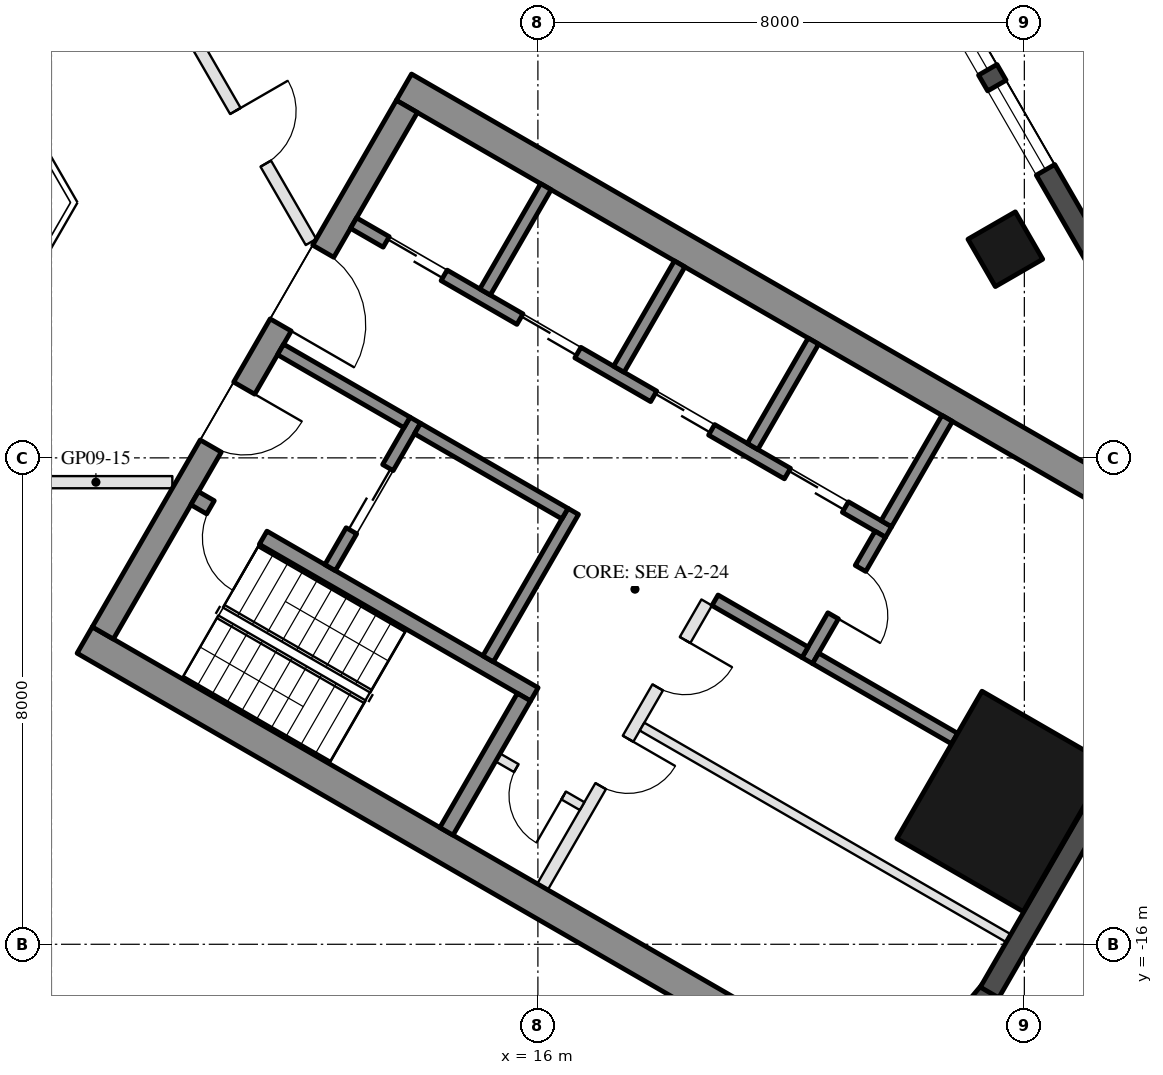
"""IFC4 building model, lengths in metres.
Left out: names, types, materials, properties, quantities, classifications, styles, units other than length and angle.
Written with IfcOpenShell. Run it as: python <this file> out.ifc"""

import sys

from ifc_helpers import new_model, si_unit, direction, frame, frame_2d, origin, origin_2d, place, context, subcontext, project, spatial, rectangle, hollow_rectangle, extrude, element, fill, save


model = new_model("IFC4")
c1 = context("Model", 3, precision=1e-05, world=origin(), true_north=direction((0.0, 1.0)))
c2 = subcontext(c1, "Body", "Model", "MODEL_VIEW")
j1 = project(units=[si_unit("LENGTHUNIT", "METRE"), si_unit("PLANEANGLEUNIT", "RADIAN")], contexts=[c1])
p1 = place(None, origin())
s1 = spatial("IfcSite", under=j1, at=p1, CompositionType="ELEMENT")
p2 = place(p1, origin())
s2 = spatial("IfcBuilding", under=s1, at=p2, CompositionType="ELEMENT")
p3 = place(p2, frame((0.0, 0.0, 109.4)))
s3 = spatial("IfcBuildingStorey", under=s2, at=p3, CompositionType="ELEMENT", Elevation=109.4)
p4 = place(p3, frame((23.688, -4.568, 0.0), z_axis=(0.0, 0.0, 1.0), x_axis=(-0.5, 0.866025403784, 0.0)))
e1 = element("IfcColumn", 1, at=p4, inside=s3, PredefinedType="COLUMN", context=c2, shape_type="SweptSolid", body=[
    extrude(hollow_rectangle(XDim=0.9, YDim=0.9, WallThickness=0.04, at=origin_2d()), origin(), (0.0, 0.0, 1.0), 3.7),
])
p5 = place(p3, frame((23.643, -13.65, 0.0), z_axis=(0.0, 0.0, 1.0), x_axis=(0.5, 0.866025403784, 0.0)))
e2 = element("IfcColumn", 2, at=p5, inside=s3, PredefinedType="COLUMN", context=c2, shape_type="SweptSolid", body=[
    extrude(hollow_rectangle(XDim=2.8, YDim=2.4, WallThickness=0.07, at=origin_2d()), origin(), (0.0, 0.0, 1.0), 3.7),
])
p6 = place(p3, frame((22.217, -18.231, 0.0), z_axis=(0.0, 0.0, 1.0), x_axis=(0.642733291068, 0.76609001857, 0.0)))
e3 = element("IfcWall", 3, at=p6, inside=s3, PredefinedType="SOLIDWALL", context=c2, shape_type="SweptSolid", body=[
    extrude(rectangle(XDim=1.91, YDim=0.35, at=frame_2d((0.955, 0.0))), origin(), (0.0, 0.0, 1.0), 3.55),
])
p7 = place(p3, frame((23.427, -16.792, 0.0), z_axis=(0.0, 0.0, 1.0), x_axis=(0.500018773155, 0.866014564827, 0.0)))
e4 = element("IfcWall", 4, at=p7, inside=s3, PredefinedType="SOLIDWALL", context=c2, shape_type="SweptSolid", body=[
    extrude(rectangle(XDim=5.658, YDim=0.35, at=frame_2d((2.829, 0.0))), origin(), (0.0, 0.0, 1.0), 3.55),
])
p8 = place(p3, frame((26.257, -6.567, 0.0), z_axis=(0.0, 0.0, 1.0), x_axis=(-0.500023526245, 0.866011820475, 0.0)))
e5 = element("IfcWall", 5, at=p8, inside=s3, PredefinedType="SOLIDWALL", context=c2, shape_type="SweptSolid", body=[
    extrude(rectangle(XDim=11.816, YDim=0.35, at=frame_2d((5.908, 0.0))), origin(), (0.0, 0.0, 1.0), 3.55),
])
p9 = place(p8, frame((0.38, 0.0, 0.3)))
e6 = element("IfcOpeningElement", 6, at=p9, cuts=e5, PredefinedType="OPENING", context=c2, shape_type="SweptSolid", body=[
    extrude(rectangle(XDim=1.8, YDim=2.65, at=frame_2d((0.9, 1.325))), frame((0.0, 0.185, 0.0), z_axis=(0.0, -1.0, 0.0), x_axis=(1.0, 0.0, 0.0)), (0.0, 0.0, 1.0), 0.37),
])
p10 = place(p8, frame((7.716, 0.0, 0.0)))
e7 = element("IfcOpeningElement", 7, at=p10, cuts=e5, PredefinedType="OPENING", context=c2, shape_type="SweptSolid", body=[
    extrude(rectangle(XDim=2.4, YDim=2.4, at=frame_2d((1.2, 1.2))), frame((0.0, 0.185, 0.0), z_axis=(0.0, -1.0, 0.0), x_axis=(1.0, 0.0, 0.0)), (0.0, 0.0, 1.0), 0.37),
])
p11 = place(p8, frame((3.816, 0.0, 0.3)))
e8 = element("IfcOpeningElement", 8, at=p11, cuts=e5, PredefinedType="OPENING", context=c2, shape_type="SweptSolid", body=[
    extrude(rectangle(XDim=1.6, YDim=2.65, at=frame_2d((0.8, 1.325))), frame((0.0, 0.185, 0.0), z_axis=(0.0, -1.0, 0.0), x_axis=(1.0, 0.0, 0.0)), (0.0, 0.0, 1.0), 0.37),
])
p12 = place(p8, frame((5.716, 0.0, 0.3)))
e9 = element("IfcOpeningElement", 9, at=p12, cuts=e5, PredefinedType="OPENING", context=c2, shape_type="SweptSolid", body=[
    extrude(rectangle(XDim=1.6, YDim=2.65, at=frame_2d((0.8, 1.325))), frame((0.0, 0.185, 0.0), z_axis=(0.0, -1.0, 0.0), x_axis=(1.0, 0.0, 0.0)), (0.0, 0.0, 1.0), 0.37),
])
for number, where, z_axis, x_axis in (
    (10, (8.547, -10.997, 0.0), (0.0, 0.0, 1.0), (0.866, -0.5, 0.0)),
    (11, (13.797, -1.903, 0.0), (0.0, 0.0, 1.0), (0.866, -0.5, 0.0)),
):
    element("IfcWall", number, at=place(p3, frame(where, z_axis=z_axis, x_axis=x_axis)), inside=s3, PredefinedType="SHEAR", context=c2, shape_type="SweptSolid", body=[
        extrude(rectangle(XDim=14.837, YDim=0.5, at=frame_2d((7.418, 0.0))), origin(), (0.0, 0.0, 1.0), 3.5),
    ])
p13 = place(p3, frame((8.845, -10.88, 0.0), z_axis=(0.0, 0.0, 1.0), x_axis=(0.500004234368, 0.866022959057, 0.0)))
e12 = element("IfcWall", 12, at=p13, inside=s3, PredefinedType="SHEAR", context=c2, shape_type="SweptSolid", body=[
    extrude(rectangle(XDim=10.0, YDim=0.4, at=frame_2d((5.0, 0.0))), origin(), (0.0, 0.0, 1.0), 3.5),
])
p14 = place(p13, frame((3.55, 0.0, 0.0)))
e13 = element("IfcOpeningElement", 13, at=p14, cuts=e12, PredefinedType="OPENING", context=c2, shape_type="SweptSolid", body=[
    extrude(rectangle(XDim=1.1, YDim=2.1, at=frame_2d((0.55, 1.05))), frame((0.0, 0.21, 0.0), z_axis=(0.0, -1.0, 0.0), x_axis=(1.0, 0.0, 0.0)), (0.0, 0.0, 1.0), 0.42),
])
p15 = place(p13, frame((5.85, 0.0, 0.0)))
e14 = element("IfcOpeningElement", 14, at=p15, cuts=e12, PredefinedType="OPENING", context=c2, shape_type="SweptSolid", body=[
    extrude(rectangle(XDim=1.4, YDim=2.1, at=frame_2d((0.7, 1.05))), frame((0.0, 0.21, 0.0), z_axis=(0.0, -1.0, 0.0), x_axis=(1.0, 0.0, 0.0)), (0.0, 0.0, 1.0), 0.42),
])
p16 = place(p3, frame((10.356, -8.664, 0.0), z_axis=(0.0, 0.0, 1.0), x_axis=(0.866028629588, -0.499994412703, 0.0)))
e15 = element("IfcWall", 15, at=p16, inside=s3, PredefinedType="SHEAR", context=c2, shape_type="SweptSolid", body=[
    extrude(rectangle(XDim=6.45, YDim=0.25, at=frame_2d((3.225, 0.0))), origin(), (0.0, 0.0, 1.0), 3.5),
])
p17 = place(p16, frame((0.3, 0.0, 0.0)))
e16 = element("IfcOpeningElement", 16, at=p17, cuts=e15, PredefinedType="OPENING", context=c2, shape_type="SweptSolid", body=[
    extrude(rectangle(XDim=1.0, YDim=2.1, at=frame_2d((0.5, 1.05))), frame((0.0, 0.135, 0.0), z_axis=(0.0, -1.0, 0.0), x_axis=(1.0, 0.0, 0.0)), (0.0, 0.0, 1.0), 0.27),
])
p18 = place(p3, frame((14.496, -14.143, 0.0), z_axis=(0.0, 0.0, 1.0), x_axis=(0.500062241894, 0.865989465428, 0.0)))
e17 = element("IfcWall", 17, at=p18, inside=s3, PredefinedType="SHEAR", context=c2, shape_type="SweptSolid", body=[
    extrude(rectangle(XDim=2.55, YDim=0.25, at=frame_2d((1.275, 0.0))), origin(), (0.0, 0.0, 1.0), 3.5),
])
p19 = place(p3, frame((15.181, -11.305, 0.0), z_axis=(0.0, 0.0, 1.0), x_axis=(0.49994636267, 0.866056369097, 0.0)))
e18 = element("IfcWall", 18, at=p19, inside=s3, PredefinedType="SHEAR", context=c2, shape_type="SweptSolid", body=[
    extrude(rectangle(XDim=2.8, YDim=0.2, at=frame_2d((1.4, 0.0))), origin(), (0.0, 0.0, 1.0), 3.5),
])
p20 = place(p3, frame((12.583, -9.805, 0.0), z_axis=(0.0, 0.0, 1.0), x_axis=(0.49994636267, 0.866056369097, 0.0)))
e19 = element("IfcWall", 19, at=p20, inside=s3, PredefinedType="SHEAR", context=c2, shape_type="SweptSolid", body=[
    extrude(rectangle(XDim=2.8, YDim=0.2, at=frame_2d((1.4, 0.0))), origin(), (0.0, 0.0, 1.0), 3.5),
])
p21 = place(p20, frame((0.7, 0.0, 0.0)))
e20 = element("IfcOpeningElement", 20, at=p21, cuts=e19, PredefinedType="OPENING", context=c2, shape_type="SweptSolid", body=[
    extrude(rectangle(XDim=1.2, YDim=2.1, at=frame_2d((0.6, 1.05))), frame((0.0, 0.11, 0.0), z_axis=(0.0, -1.0, 0.0), x_axis=(1.0, 0.0, 0.0)), (0.0, 0.0, 1.0), 0.22),
])
p22 = place(p3, frame((11.768, -6.217, 0.0), z_axis=(0.0, 0.0, 1.0), x_axis=(0.866050077142, -0.499957262057, 0.0)))
e21 = element("IfcWall", 21, at=p22, inside=s3, PredefinedType="SHEAR", context=c2, shape_type="SweptSolid", body=[
    extrude(rectangle(XDim=2.4, YDim=0.2, at=frame_2d((1.2, 0.0))), origin(), (0.0, 0.0, 1.0), 3.5),
])
p23 = place(p3, frame((14.02, -7.517, 0.0), z_axis=(0.0, 0.0, 1.0), x_axis=(0.866034573852, -0.49998411664, 0.0)))
e22 = element("IfcWall", 22, at=p23, inside=s3, PredefinedType="SHEAR", context=c2, shape_type="SweptSolid", body=[
    extrude(rectangle(XDim=2.8, YDim=0.2, at=frame_2d((1.4, 0.0))), origin(), (0.0, 0.0, 1.0), 3.5),
])
p24 = place(p3, frame((12.968, -4.138, 0.0), z_axis=(0.0, 0.0, 1.0), x_axis=(0.866028328073, -0.49999493495, 0.0)))
e23 = element("IfcWall", 23, at=p24, inside=s3, PredefinedType="SHEAR", context=c2, shape_type="SweptSolid", body=[
    extrude(rectangle(XDim=10.16, YDim=0.2, at=frame_2d((5.08, 0.0))), origin(), (0.0, 0.0, 1.0), 3.5),
])
p25 = place(p24, frame((0.62, 0.0, 0.0)))
e24 = element("IfcOpeningElement", 24, at=p25, cuts=e23, PredefinedType="OPENING", context=c2, shape_type="SweptSolid", body=[
    extrude(rectangle(XDim=1.1, YDim=2.1, at=frame_2d((0.55, 1.05))), frame((0.0, 0.11, 0.0), z_axis=(0.0, -1.0, 0.0), x_axis=(1.0, 0.0, 0.0)), (0.0, 0.0, 1.0), 0.22),
])
p26 = place(p24, frame((3.16, 0.0, 0.0)))
e25 = element("IfcOpeningElement", 25, at=p26, cuts=e23, PredefinedType="OPENING", context=c2, shape_type="SweptSolid", body=[
    extrude(rectangle(XDim=1.1, YDim=2.1, at=frame_2d((0.55, 1.05))), frame((0.0, 0.11, 0.0), z_axis=(0.0, -1.0, 0.0), x_axis=(1.0, 0.0, 0.0)), (0.0, 0.0, 1.0), 0.22),
])
p27 = place(p24, frame((5.7, 0.0, 0.0)))
e26 = element("IfcOpeningElement", 26, at=p27, cuts=e23, PredefinedType="OPENING", context=c2, shape_type="SweptSolid", body=[
    extrude(rectangle(XDim=1.1, YDim=2.1, at=frame_2d((0.55, 1.05))), frame((0.0, 0.11, 0.0), z_axis=(0.0, -1.0, 0.0), x_axis=(1.0, 0.0, 0.0)), (0.0, 0.0, 1.0), 0.22),
])
p28 = place(p24, frame((8.24, 0.0, 0.0)))
e27 = element("IfcOpeningElement", 27, at=p28, cuts=e23, PredefinedType="OPENING", context=c2, shape_type="SweptSolid", body=[
    extrude(rectangle(XDim=1.1, YDim=2.1, at=frame_2d((0.55, 1.05))), frame((0.0, 0.11, 0.0), z_axis=(0.0, -1.0, 0.0), x_axis=(1.0, 0.0, 0.0)), (0.0, 0.0, 1.0), 0.22),
])
p29 = place(p3, frame((20.43, -11.333, 0.0), z_axis=(0.0, 0.0, 1.0), x_axis=(0.500001309137, 0.866024647952, 0.0)))
e28 = element("IfcWall", 28, at=p29, inside=s3, PredefinedType="SHEAR", context=c2, shape_type="SweptSolid", body=[
    extrude(rectangle(XDim=2.4, YDim=0.2, at=frame_2d((1.2, 0.0))), origin(), (0.0, 0.0, 1.0), 3.5),
])
p30 = place(p29, frame((0.85, 0.0, 0.0)))
e29 = element("IfcOpeningElement", 29, at=p30, cuts=e28, PredefinedType="OPENING", context=c2, shape_type="SweptSolid", body=[
    extrude(rectangle(XDim=0.9, YDim=2.1, at=frame_2d((0.45, 1.05))), frame((0.0, 0.11, 0.0), z_axis=(0.0, -1.0, 0.0), x_axis=(1.0, 0.0, 0.0)), (0.0, 0.0, 1.0), 0.22),
])
p31 = place(p3, frame((18.913, -10.342, 0.0), z_axis=(0.0, 0.0, 1.0), x_axis=(0.866038183914, -0.499977863513, 0.0)))
e30 = element("IfcWall", 30, at=p31, inside=s3, PredefinedType="SHEAR", context=c2, shape_type="SweptSolid", body=[
    extrude(rectangle(XDim=1.71, YDim=0.2, at=frame_2d((0.855, 0.0))), origin(), (0.0, 0.0, 1.0), 3.5),
])
for number, where, z_axis, x_axis in (
    (31, (15.131, -5.272, 0.0), (0.0, 0.0, 1.0), (0.5, 0.866, 0.0)),
    (32, (17.331, -6.542, 0.0), (0.0, 0.0, 1.0), (0.5, 0.866, 0.0)),
    (33, (19.531, -7.812, 0.0), (0.0, 0.0, 1.0), (0.5, 0.866, 0.0)),
    (34, (21.73, -9.082, 0.0), (0.0, 0.0, 1.0), (0.5, 0.866, 0.0)),
):
    element("IfcWall", number, at=place(p3, frame(where, z_axis=z_axis, x_axis=x_axis)), inside=s3, PredefinedType="SHEAR", context=c2, shape_type="SweptSolid", body=[
        extrude(rectangle(XDim=2.0, YDim=0.2, at=frame_2d((1.0, 0.0))), origin(), (0.0, 0.0, 1.0), 3.5),
    ])
p32 = place(p3, frame((20.567, -11.297, 0.0), z_axis=(0.0, 0.0, 1.0), x_axis=(0.866060851709, -0.499938597367, 0.0)))
e35 = element("IfcWall", 35, at=p32, inside=s3, PredefinedType="SHEAR", context=c2, shape_type="SweptSolid", body=[
    extrude(rectangle(XDim=2.64, YDim=0.2, at=frame_2d((1.32, 0.0))), origin(), (0.0, 0.0, 1.0), 3.5),
])
p33 = place(p3, frame((16.076, -15.055, 0.0), z_axis=(0.0, 0.0, 1.0), x_axis=(0.499995103361, 0.866028230842, 0.0)))
e36 = element("IfcWall", 36, at=p33, inside=s3, PredefinedType="PARTITIONING", context=c2, shape_type="SweptSolid", body=[
    extrude(rectangle(XDim=5.4, YDim=0.2, at=frame_2d((2.7, 0.0))), origin(), (0.0, 0.0, 1.0), 3.5),
])
p34 = place(p33, frame((1.913, 0.0, 0.0)))
e37 = element("IfcOpeningElement", 37, at=p34, cuts=e36, PredefinedType="OPENING", context=c2, shape_type="SweptSolid", body=[
    extrude(rectangle(XDim=0.9, YDim=2.1, at=frame_2d((0.45, 1.05))), frame((0.0, 0.11, 0.0), z_axis=(0.0, -1.0, 0.0), x_axis=(1.0, 0.0, 0.0)), (0.0, 0.0, 1.0), 0.22),
])
p35 = place(p33, frame((3.788, 0.0, 0.0)))
e38 = element("IfcOpeningElement", 38, at=p35, cuts=e36, PredefinedType="OPENING", context=c2, shape_type="SweptSolid", body=[
    extrude(rectangle(XDim=0.9, YDim=2.1, at=frame_2d((0.45, 1.05))), frame((0.0, 0.11, 0.0), z_axis=(0.0, -1.0, 0.0), x_axis=(1.0, 0.0, 0.0)), (0.0, 0.0, 1.0), 0.22),
])
p36 = place(p3, frame((15.342, -12.928, 0.0), z_axis=(0.0, 0.0, 1.0), x_axis=(0.865989903783, -0.500061482766, 0.0)))
e39 = element("IfcWall", 39, at=p36, inside=s3, PredefinedType="PARTITIONING", context=c2, shape_type="SweptSolid", body=[
    extrude(rectangle(XDim=1.6, YDim=0.15, at=frame_2d((0.8, 0.0))), origin(), (0.0, 0.0, 1.0), 3.5),
])
p37 = place(p36, frame((0.35, 0.0, 0.0)))
e40 = element("IfcOpeningElement", 40, at=p37, cuts=e39, PredefinedType="OPENING", context=c2, shape_type="SweptSolid", body=[
    extrude(rectangle(XDim=0.9, YDim=2.1, at=frame_2d((0.45, 1.05))), frame((0.0, 0.085, 0.0), z_axis=(0.0, -1.0, 0.0), x_axis=(1.0, 0.0, 0.0)), (0.0, 0.0, 1.0), 0.17),
])
p38 = place(p3, frame((17.713, -12.42, 0.0), z_axis=(0.0, 0.0, 1.0), x_axis=(0.866016523273, -0.500015381182, 0.0)))
e41 = element("IfcWall", 41, at=p38, inside=s3, PredefinedType="PARTITIONING", context=c2, shape_type="SweptSolid", body=[
    extrude(rectangle(XDim=6.95, YDim=0.15, at=frame_2d((3.475, 0.0))), origin(), (0.0, 0.0, 1.0), 3.5),
])
p39 = place(p3, frame((9.988, -8.4, 0.0), z_axis=(0.0, 0.0, 1.0), x_axis=(-1.0, 0.0, 0.0)))
e42 = element("IfcWall", 42, at=p39, inside=s3, PredefinedType="PARTITIONING", context=c2, shape_type="SweptSolid", body=[
    extrude(rectangle(XDim=6.285, YDim=0.2, at=frame_2d((3.143, 0.0))), origin(), (0.0, 0.0, 1.0), 2.95),
])
p40 = place(p39, frame((2.642, 0.0, 0.0)))
e43 = element("IfcOpeningElement", 43, at=p40, cuts=e42, PredefinedType="OPENING", context=c2, shape_type="SweptSolid", body=[
    extrude(rectangle(XDim=1.0, YDim=2.1, at=frame_2d((0.5, 1.05))), frame((0.0, 0.11, 0.0), z_axis=(0.0, -1.0, 0.0), x_axis=(1.0, 0.0, 0.0)), (0.0, 0.0, 1.0), 0.22),
])
p41 = place(p3, frame((10.281, -1.006, 0.0), z_axis=(0.0, 0.0, 1.0), x_axis=(0.499995262016, -0.866028139243, 0.0)))
e44 = element("IfcWall", 44, at=p41, inside=s3, PredefinedType="PARTITIONING", context=c2, shape_type="SweptSolid", body=[
    extrude(rectangle(XDim=3.977, YDim=0.2, at=frame_2d((1.988, 0.0))), origin(), (0.0, 0.0, 1.0), 2.95),
])
p42 = place(p41, frame((1.488, 0.0, 0.0)))
e45 = element("IfcOpeningElement", 45, at=p42, cuts=e44, PredefinedType="OPENING", context=c2, shape_type="SweptSolid", body=[
    extrude(rectangle(XDim=1.0, YDim=2.1, at=frame_2d((0.5, 1.05))), frame((0.0, 0.11, 0.0), z_axis=(0.0, -1.0, 0.0), x_axis=(1.0, 0.0, 0.0)), (0.0, 0.0, 1.0), 0.22),
])
p43 = place(p11, origin())
e46 = element("IfcWindow", 46, at=p43, inside=s3, PartitioningType="SINGLE_PANEL", PredefinedType="WINDOW", context=c2, shape_type="SweptSolid", body=[
    extrude(rectangle(XDim=1.6, YDim=2.65, at=frame_2d((0.8, 1.325))), frame((0.0, 0.03, 0.0), z_axis=(0.0, -1.0, 0.0), x_axis=(1.0, 0.0, 0.0)), (0.0, 0.0, 1.0), 0.06),
])
fill(e8, e46)
p44 = place(p12, origin())
e47 = element("IfcWindow", 47, at=p44, inside=s3, PartitioningType="SINGLE_PANEL", PredefinedType="WINDOW", context=c2, shape_type="SweptSolid", body=[
    extrude(rectangle(XDim=1.6, YDim=2.65, at=frame_2d((0.8, 1.325))), frame((0.0, 0.03, 0.0), z_axis=(0.0, -1.0, 0.0), x_axis=(1.0, 0.0, 0.0)), (0.0, 0.0, 1.0), 0.06),
])
fill(e9, e47)
p45 = place(p21, origin())
e48 = element("IfcDoor", 48, at=p45, inside=s3, OperationType="DOUBLE_DOOR_SLIDING", PredefinedType="DOOR", context=c2, shape_type="SweptSolid", body=[
    extrude(rectangle(XDim=1.2, YDim=2.1, at=frame_2d((0.6, 1.05))), frame((0.0, 0.025, 0.0), z_axis=(0.0, -1.0, 0.0), x_axis=(1.0, 0.0, 0.0)), (0.0, 0.0, 1.0), 0.05),
])
fill(e20, e48)
p46 = place(p37, frame((0.9, 0.0, 0.0), z_axis=(0.0, 0.0, 1.0), x_axis=(-1.0, 0.0, 0.0)))
e49 = element("IfcDoor", 49, at=p46, inside=s3, OperationType="SINGLE_SWING_LEFT", PredefinedType="DOOR", context=c2, shape_type="SweptSolid", body=[
    extrude(rectangle(XDim=0.9, YDim=2.1, at=frame_2d((0.45, 1.05))), frame((0.0, 0.025, 0.0), z_axis=(0.0, -1.0, 0.0), x_axis=(1.0, 0.0, 0.0)), (0.0, 0.0, 1.0), 0.05),
])
fill(e40, e49)
p47 = place(p25, origin())
e50 = element("IfcDoor", 50, at=p47, inside=s3, OperationType="DOUBLE_DOOR_SLIDING", PredefinedType="DOOR", context=c2, shape_type="SweptSolid", body=[
    extrude(rectangle(XDim=1.1, YDim=2.1, at=frame_2d((0.55, 1.05))), frame((0.0, 0.025, 0.0), z_axis=(0.0, -1.0, 0.0), x_axis=(1.0, 0.0, 0.0)), (0.0, 0.0, 1.0), 0.05),
])
fill(e24, e50)
p48 = place(p26, origin())
e51 = element("IfcDoor", 51, at=p48, inside=s3, OperationType="DOUBLE_DOOR_SLIDING", PredefinedType="DOOR", context=c2, shape_type="SweptSolid", body=[
    extrude(rectangle(XDim=1.1, YDim=2.1, at=frame_2d((0.55, 1.05))), frame((0.0, 0.025, 0.0), z_axis=(0.0, -1.0, 0.0), x_axis=(1.0, 0.0, 0.0)), (0.0, 0.0, 1.0), 0.05),
])
fill(e25, e51)
p49 = place(p27, origin())
e52 = element("IfcDoor", 52, at=p49, inside=s3, OperationType="DOUBLE_DOOR_SLIDING", PredefinedType="DOOR", context=c2, shape_type="SweptSolid", body=[
    extrude(rectangle(XDim=1.1, YDim=2.1, at=frame_2d((0.55, 1.05))), frame((0.0, 0.025, 0.0), z_axis=(0.0, -1.0, 0.0), x_axis=(1.0, 0.0, 0.0)), (0.0, 0.0, 1.0), 0.05),
])
fill(e26, e52)
p50 = place(p28, origin())
e53 = element("IfcDoor", 53, at=p50, inside=s3, OperationType="DOUBLE_DOOR_SLIDING", PredefinedType="DOOR", context=c2, shape_type="SweptSolid", body=[
    extrude(rectangle(XDim=1.1, YDim=2.1, at=frame_2d((0.55, 1.05))), frame((0.0, 0.025, 0.0), z_axis=(0.0, -1.0, 0.0), x_axis=(1.0, 0.0, 0.0)), (0.0, 0.0, 1.0), 0.05),
])
fill(e27, e53)
p51 = place(p30, frame((0.9, 0.0, 0.0), z_axis=(0.0, 0.0, 1.0), x_axis=(-1.0, 0.0, 0.0)))
e54 = element("IfcDoor", 54, at=p51, inside=s3, OperationType="SINGLE_SWING_RIGHT", PredefinedType="DOOR", context=c2, shape_type="SweptSolid", body=[
    extrude(rectangle(XDim=0.9, YDim=2.1, at=frame_2d((0.45, 1.05))), frame((0.0, 0.025, 0.0), z_axis=(0.0, -1.0, 0.0), x_axis=(1.0, 0.0, 0.0)), (0.0, 0.0, 1.0), 0.05),
])
fill(e29, e54)
p52 = place(p34, frame((0.9, 0.0, 0.0), z_axis=(0.0, 0.0, 1.0), x_axis=(-1.0, 0.0, 0.0)))
e55 = element("IfcDoor", 55, at=p52, inside=s3, OperationType="SINGLE_SWING_LEFT", PredefinedType="DOOR", context=c2, shape_type="SweptSolid", body=[
    extrude(rectangle(XDim=0.9, YDim=2.1, at=frame_2d((0.45, 1.05))), frame((0.0, 0.025, 0.0), z_axis=(0.0, -1.0, 0.0), x_axis=(1.0, 0.0, 0.0)), (0.0, 0.0, 1.0), 0.05),
])
fill(e37, e55)
p53 = place(p35, frame((0.9, 0.0, 0.0), z_axis=(0.0, 0.0, 1.0), x_axis=(-1.0, 0.0, 0.0)))
e56 = element("IfcDoor", 56, at=p53, inside=s3, OperationType="SINGLE_SWING_LEFT", PredefinedType="DOOR", context=c2, shape_type="SweptSolid", body=[
    extrude(rectangle(XDim=0.9, YDim=2.1, at=frame_2d((0.45, 1.05))), frame((0.0, 0.025, 0.0), z_axis=(0.0, -1.0, 0.0), x_axis=(1.0, 0.0, 0.0)), (0.0, 0.0, 1.0), 0.05),
])
fill(e38, e56)
p54 = place(p14, frame((1.1, 0.0, 0.0), z_axis=(0.0, 0.0, 1.0), x_axis=(-1.0, 0.0, 0.0)))
e57 = element("IfcDoor", 57, at=p54, inside=s3, OperationType="SINGLE_SWING_LEFT", PredefinedType="DOOR", context=c2, shape_type="SweptSolid", body=[
    extrude(rectangle(XDim=1.1, YDim=2.1, at=frame_2d((0.55, 1.05))), frame((0.0, 0.025, 0.0), z_axis=(0.0, -1.0, 0.0), x_axis=(1.0, 0.0, 0.0)), (0.0, 0.0, 1.0), 0.05),
])
fill(e13, e57)
p55 = place(p15, frame((1.4, 0.0, 0.0), z_axis=(0.0, 0.0, 1.0), x_axis=(-1.0, 0.0, 0.0)))
e58 = element("IfcDoor", 58, at=p55, inside=s3, OperationType="DOUBLE_DOOR_SINGLE_SWING", PredefinedType="DOOR", context=c2, shape_type="SweptSolid", body=[
    extrude(rectangle(XDim=1.4, YDim=2.1, at=frame_2d((0.7, 1.05))), frame((0.0, 0.025, 0.0), z_axis=(0.0, -1.0, 0.0), x_axis=(1.0, 0.0, 0.0)), (0.0, 0.0, 1.0), 0.05),
])
fill(e14, e58)
p56 = place(p17, frame((1.0, 0.0, 0.0), z_axis=(0.0, 0.0, 1.0), x_axis=(-1.0, 0.0, 0.0)))
e59 = element("IfcDoor", 59, at=p56, inside=s3, OperationType="SINGLE_SWING_LEFT", PredefinedType="DOOR", context=c2, shape_type="SweptSolid", body=[
    extrude(rectangle(XDim=1.0, YDim=2.1, at=frame_2d((0.5, 1.05))), frame((0.0, 0.025, 0.0), z_axis=(0.0, -1.0, 0.0), x_axis=(1.0, 0.0, 0.0)), (0.0, 0.0, 1.0), 0.05),
])
fill(e16, e59)
p57 = place(p42, origin())
e60 = element("IfcDoor", 60, at=p57, inside=s3, OperationType="SINGLE_SWING_LEFT", PredefinedType="DOOR", context=c2, shape_type="SweptSolid", body=[
    extrude(rectangle(XDim=1.0, YDim=2.1, at=frame_2d((0.5, 1.05))), frame((0.0, 0.025, 0.0), z_axis=(0.0, -1.0, 0.0), x_axis=(1.0, 0.0, 0.0)), (0.0, 0.0, 1.0), 0.05),
])
fill(e45, e60)
save(model, sys.argv[1])
